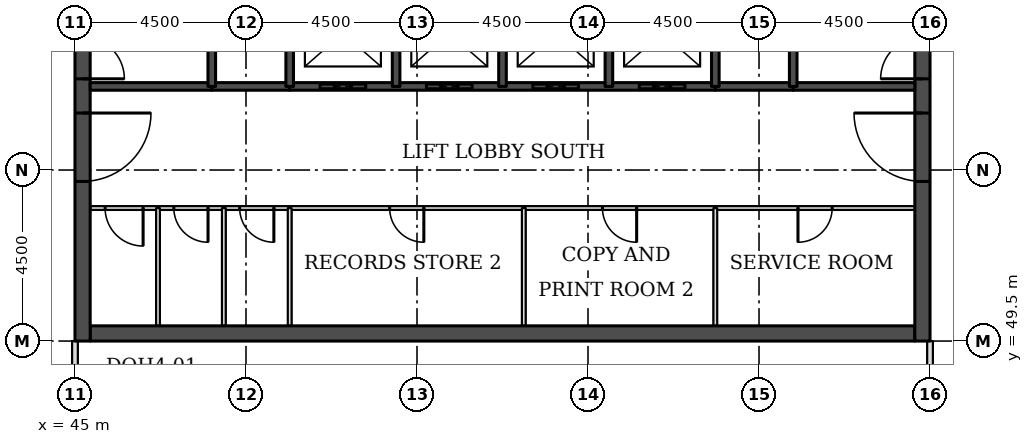
"""IFC4 building model, lengths in metres.
Left out: names, types, materials, properties, quantities, classifications, styles, units other than length and angle.
Written with IfcOpenShell. Run it as: python <this file> out.ifc"""

import sys

from ifc_helpers import new_model, si_unit, direction, frame, frame_2d, origin, place, context, subcontext, project, spatial, rectangle, extrude, element, fill, save


model = new_model("IFC4")
c1 = context("Model", 3, precision=1e-05, world=origin(), true_north=direction((0.0, 1.0)))
c2 = subcontext(c1, "Body", "Model", "MODEL_VIEW")
j1 = project(units=[si_unit("LENGTHUNIT", "METRE"), si_unit("PLANEANGLEUNIT", "RADIAN")], contexts=[c1])
p1 = place(None, origin())
s1 = spatial("IfcSite", under=j1, at=p1, CompositionType="ELEMENT")
p2 = place(p1, origin())
s2 = spatial("IfcBuilding", under=s1, at=p2, CompositionType="ELEMENT")
p3 = place(p2, frame((0.0, 0.0, 169.9)))
s3 = spatial("IfcBuildingStorey", under=s2, at=p3, CompositionType="ELEMENT", Elevation=169.9)
p4 = place(p3, frame((45.4, 49.7, 0.0), z_axis=(0.0, 0.0, 1.0), x_axis=(1.0, 0.0, 0.0)))
e1 = element("IfcWall", 1, at=p4, inside=s3, PredefinedType="SHEAR", context=c2, shape_type="SweptSolid", body=[
    extrude(rectangle(XDim=21.7, YDim=0.4, at=frame_2d((10.85, 0.0))), origin(), (0.0, 0.0, 1.0), 3.7),
])
p5 = place(p3, frame((45.2, 49.5, 0.0), z_axis=(0.0, 0.0, 1.0), x_axis=(0.0, 1.0, 0.0)))
e2 = element("IfcWall", 2, at=p5, inside=s3, PredefinedType="SHEAR", context=c2, shape_type="SweptSolid", body=[
    extrude(rectangle(XDim=22.5, YDim=0.4, at=frame_2d((11.25, 0.0))), origin(), (0.0, 0.0, 1.0), 3.7),
])
p6 = place(p5, frame((4.2, 0.0, 0.0)))
e3 = element("IfcOpeningElement", 3, at=p6, cuts=e2, PredefinedType="OPENING", context=c2, shape_type="SweptSolid", body=[
    extrude(rectangle(XDim=1.8, YDim=2.1, at=frame_2d((0.9, 1.05))), frame((0.0, 0.21, 0.0), z_axis=(0.0, -1.0, 0.0), x_axis=(1.0, 0.0, 0.0)), (0.0, 0.0, 1.0), 0.42),
])
p7 = place(p5, frame((6.9, 0.0, 0.0)))
e4 = element("IfcOpeningElement", 4, at=p7, cuts=e2, PredefinedType="OPENING", context=c2, shape_type="SweptSolid", body=[
    extrude(rectangle(XDim=1.1, YDim=2.1, at=frame_2d((0.55, 1.05))), frame((0.0, 0.21, 0.0), z_axis=(0.0, -1.0, 0.0), x_axis=(1.0, 0.0, 0.0)), (0.0, 0.0, 1.0), 0.42),
])
p8 = place(p5, frame((13.6, 0.0, 0.0)))
e5 = element("IfcOpeningElement", 5, at=p8, cuts=e2, PredefinedType="OPENING", context=c2, shape_type="SweptSolid", body=[
    extrude(rectangle(XDim=1.1, YDim=2.1, at=frame_2d((0.55, 1.05))), frame((0.0, 0.21, 0.0), z_axis=(0.0, -1.0, 0.0), x_axis=(1.0, 0.0, 0.0)), (0.0, 0.0, 1.0), 0.42),
])
p9 = place(p5, frame((16.5, 0.0, 0.0)))
e6 = element("IfcOpeningElement", 6, at=p9, cuts=e2, PredefinedType="OPENING", context=c2, shape_type="SweptSolid", body=[
    extrude(rectangle(XDim=1.8, YDim=2.1, at=frame_2d((0.9, 1.05))), frame((0.0, 0.21, 0.0), z_axis=(0.0, -1.0, 0.0), x_axis=(1.0, 0.0, 0.0)), (0.0, 0.0, 1.0), 0.42),
])
p10 = place(p3, frame((67.3, 49.5, 0.0), z_axis=(0.0, 0.0, 1.0), x_axis=(0.0, 1.0, 0.0)))
e7 = element("IfcWall", 7, at=p10, inside=s3, PredefinedType="SHEAR", context=c2, shape_type="SweptSolid", body=[
    extrude(rectangle(XDim=22.5, YDim=0.4, at=frame_2d((11.25, 0.0))), origin(), (0.0, 0.0, 1.0), 3.7),
])
p11 = place(p10, frame((4.2, 0.0, 0.0)))
e8 = element("IfcOpeningElement", 8, at=p11, cuts=e7, PredefinedType="OPENING", context=c2, shape_type="SweptSolid", body=[
    extrude(rectangle(XDim=1.8, YDim=2.1, at=frame_2d((0.9, 1.05))), frame((0.0, 0.21, 0.0), z_axis=(0.0, -1.0, 0.0), x_axis=(1.0, 0.0, 0.0)), (0.0, 0.0, 1.0), 0.42),
])
p12 = place(p10, frame((6.9, 0.0, 0.0)))
e9 = element("IfcOpeningElement", 9, at=p12, cuts=e7, PredefinedType="OPENING", context=c2, shape_type="SweptSolid", body=[
    extrude(rectangle(XDim=1.1, YDim=2.1, at=frame_2d((0.55, 1.05))), frame((0.0, 0.21, 0.0), z_axis=(0.0, -1.0, 0.0), x_axis=(1.0, 0.0, 0.0)), (0.0, 0.0, 1.0), 0.42),
])
p13 = place(p10, frame((13.6, 0.0, 0.0)))
e10 = element("IfcOpeningElement", 10, at=p13, cuts=e7, PredefinedType="OPENING", context=c2, shape_type="SweptSolid", body=[
    extrude(rectangle(XDim=1.1, YDim=2.1, at=frame_2d((0.55, 1.05))), frame((0.0, 0.21, 0.0), z_axis=(0.0, -1.0, 0.0), x_axis=(1.0, 0.0, 0.0)), (0.0, 0.0, 1.0), 0.42),
])
p14 = place(p10, frame((16.5, 0.0, 0.0)))
e11 = element("IfcOpeningElement", 11, at=p14, cuts=e7, PredefinedType="OPENING", context=c2, shape_type="SweptSolid", body=[
    extrude(rectangle(XDim=1.8, YDim=2.1, at=frame_2d((0.9, 1.05))), frame((0.0, 0.21, 0.0), z_axis=(0.0, -1.0, 0.0), x_axis=(1.0, 0.0, 0.0)), (0.0, 0.0, 1.0), 0.42),
])
p15 = place(p3, frame((67.5, 40.05, 0.0), z_axis=(0.0, 0.0, 1.0), x_axis=(0.0, 1.0, 0.0)))
e12 = element("IfcWall", 12, at=p15, inside=s3, PredefinedType="PARTITIONING", context=c2, shape_type="SweptSolid", body=[
    extrude(rectangle(XDim=9.45, YDim=0.15, at=frame_2d((4.725, 0.0))), origin(), (0.0, 0.0, 1.0), 3.022),
])
p16 = place(p3, frame((45.0, 48.0, 0.0), z_axis=(0.0, 0.0, 1.0), x_axis=(0.0, 1.0, 0.0)))
e13 = element("IfcWall", 13, at=p16, inside=s3, PredefinedType="PARTITIONING", context=c2, shape_type="SweptSolid", body=[
    extrude(rectangle(XDim=1.5, YDim=0.15, at=frame_2d((0.75, 0.0))), origin(), (0.0, 0.0, 1.0), 3.022),
])
p17 = place(p3, frame((45.4, 53.0, 0.0), z_axis=(0.0, 0.0, 1.0), x_axis=(1.0, 0.0, 0.0)))
e14 = element("IfcWall", 14, at=p17, inside=s3, PredefinedType="PARTITIONING", context=c2, shape_type="SweptSolid", body=[
    extrude(rectangle(XDim=21.7, YDim=0.1, at=frame_2d((10.85, 0.0))), origin(), (0.0, 0.0, 1.0), 3.55),
])
p18 = place(p17, frame((18.625, 0.0, 0.0)))
e15 = element("IfcOpeningElement", 15, at=p18, cuts=e14, PredefinedType="OPENING", context=c2, shape_type="SweptSolid", body=[
    extrude(rectangle(XDim=0.9, YDim=2.1, at=frame_2d((0.45, 1.05))), frame((0.0, 0.06, 0.0), z_axis=(0.0, -1.0, 0.0), x_axis=(1.0, 0.0, 0.0)), (0.0, 0.0, 1.0), 0.12),
])
p19 = place(p17, frame((0.393, 0.0, 0.0)))
e16 = element("IfcOpeningElement", 16, at=p19, cuts=e14, PredefinedType="OPENING", context=c2, shape_type="SweptSolid", body=[
    extrude(rectangle(XDim=1.0, YDim=2.1, at=frame_2d((0.5, 1.05))), frame((0.0, 0.06, 0.0), z_axis=(0.0, -1.0, 0.0), x_axis=(1.0, 0.0, 0.0)), (0.0, 0.0, 1.0), 0.12),
])
p20 = place(p17, frame((2.201, 0.0, 0.0)))
e17 = element("IfcOpeningElement", 17, at=p20, cuts=e14, PredefinedType="OPENING", context=c2, shape_type="SweptSolid", body=[
    extrude(rectangle(XDim=0.9, YDim=2.1, at=frame_2d((0.45, 1.05))), frame((0.0, 0.06, 0.0), z_axis=(0.0, -1.0, 0.0), x_axis=(1.0, 0.0, 0.0)), (0.0, 0.0, 1.0), 0.12),
])
p21 = place(p17, frame((3.934, 0.0, 0.0)))
e18 = element("IfcOpeningElement", 18, at=p21, cuts=e14, PredefinedType="OPENING", context=c2, shape_type="SweptSolid", body=[
    extrude(rectangle(XDim=0.9, YDim=2.1, at=frame_2d((0.45, 1.05))), frame((0.0, 0.06, 0.0), z_axis=(0.0, -1.0, 0.0), x_axis=(1.0, 0.0, 0.0)), (0.0, 0.0, 1.0), 0.12),
])
p22 = place(p17, frame((7.88, 0.0, 0.0)))
e19 = element("IfcOpeningElement", 19, at=p22, cuts=e14, PredefinedType="OPENING", context=c2, shape_type="SweptSolid", body=[
    extrude(rectangle(XDim=0.9, YDim=2.1, at=frame_2d((0.45, 1.05))), frame((0.0, 0.06, 0.0), z_axis=(0.0, -1.0, 0.0), x_axis=(1.0, 0.0, 0.0)), (0.0, 0.0, 1.0), 0.12),
])
p23 = place(p17, frame((13.48, 0.0, 0.0)))
e20 = element("IfcOpeningElement", 20, at=p23, cuts=e14, PredefinedType="OPENING", context=c2, shape_type="SweptSolid", body=[
    extrude(rectangle(XDim=0.9, YDim=2.1, at=frame_2d((0.45, 1.05))), frame((0.0, 0.06, 0.0), z_axis=(0.0, -1.0, 0.0), x_axis=(1.0, 0.0, 0.0)), (0.0, 0.0, 1.0), 0.12),
])
for number, where, z_axis, x_axis in (
    (21, (48.6, 56.2, 0.0), (0.0, 0.0, 1.0), (1.0, 0.0, 0.0)),
    (22, (61.85, 56.2, 0.0), (0.0, 0.0, 1.0), (1.0, 0.0, 0.0)),
):
    element("IfcWall", number, at=place(p3, frame(where, z_axis=z_axis, x_axis=x_axis)), inside=s3, PredefinedType="SOLIDWALL", context=c2, shape_type="SweptSolid", body=[
        extrude(rectangle(XDim=2.05, YDim=0.2, at=frame_2d((1.025, 0.0))), origin(), (0.0, 0.0, 1.0), 3.55),
    ])
p24 = place(p3, frame((45.4, 56.2, 0.0), z_axis=(0.0, 0.0, 1.0), x_axis=(1.0, 0.0, 0.0)))
e23 = element("IfcWall", 23, at=p24, inside=s3, PredefinedType="SOLIDWALL", context=c2, shape_type="SweptSolid", body=[
    extrude(rectangle(XDim=3.2, YDim=0.2, at=frame_2d((1.6, 0.0))), origin(), (0.0, 0.0, 1.0), 3.55),
])
p25 = place(p3, frame((50.65, 56.2, 0.0), z_axis=(0.0, 0.0, 1.0), x_axis=(1.0, 0.0, 0.0)))
e24 = element("IfcWall", 24, at=p25, inside=s3, PredefinedType="SOLIDWALL", context=c2, shape_type="SweptSolid", body=[
    extrude(rectangle(XDim=11.2, YDim=0.2, at=frame_2d((5.6, 0.0))), origin(), (0.0, 0.0, 1.0), 3.55),
])
p26 = place(p25, frame((0.8, 0.0, 0.0)))
e25 = element("IfcOpeningElement", 25, at=p26, cuts=e24, PredefinedType="OPENING", context=c2, shape_type="SweptSolid", body=[
    extrude(rectangle(XDim=1.2, YDim=2.1, at=frame_2d((0.6, 1.05))), frame((0.0, 0.11, 0.0), z_axis=(0.0, -1.0, 0.0), x_axis=(1.0, 0.0, 0.0)), (0.0, 0.0, 1.0), 0.22),
])
p27 = place(p25, frame((3.6, 0.0, 0.0)))
e26 = element("IfcOpeningElement", 26, at=p27, cuts=e24, PredefinedType="OPENING", context=c2, shape_type="SweptSolid", body=[
    extrude(rectangle(XDim=1.2, YDim=2.1, at=frame_2d((0.6, 1.05))), frame((0.0, 0.11, 0.0), z_axis=(0.0, -1.0, 0.0), x_axis=(1.0, 0.0, 0.0)), (0.0, 0.0, 1.0), 0.22),
])
p28 = place(p25, frame((6.4, 0.0, 0.0)))
e27 = element("IfcOpeningElement", 27, at=p28, cuts=e24, PredefinedType="OPENING", context=c2, shape_type="SweptSolid", body=[
    extrude(rectangle(XDim=1.2, YDim=2.1, at=frame_2d((0.6, 1.05))), frame((0.0, 0.11, 0.0), z_axis=(0.0, -1.0, 0.0), x_axis=(1.0, 0.0, 0.0)), (0.0, 0.0, 1.0), 0.22),
])
p29 = place(p25, frame((9.2, 0.0, 0.0)))
e28 = element("IfcOpeningElement", 28, at=p29, cuts=e24, PredefinedType="OPENING", context=c2, shape_type="SweptSolid", body=[
    extrude(rectangle(XDim=1.2, YDim=2.1, at=frame_2d((0.6, 1.05))), frame((0.0, 0.11, 0.0), z_axis=(0.0, -1.0, 0.0), x_axis=(1.0, 0.0, 0.0)), (0.0, 0.0, 1.0), 0.22),
])
p30 = place(p3, frame((63.9, 56.2, 0.0), z_axis=(0.0, 0.0, 1.0), x_axis=(1.0, 0.0, 0.0)))
e29 = element("IfcWall", 29, at=p30, inside=s3, PredefinedType="SOLIDWALL", context=c2, shape_type="SweptSolid", body=[
    extrude(rectangle(XDim=3.2, YDim=0.2, at=frame_2d((1.6, 0.0))), origin(), (0.0, 0.0, 1.0), 3.55),
])
p31 = place(p3, frame((47.185, 49.9, 0.0), z_axis=(0.0, 0.0, 1.0), x_axis=(0.0, 1.0, 0.0)))
e30 = element("IfcWall", 30, at=p31, inside=s3, PredefinedType="PARTITIONING", context=c2, shape_type="SweptSolid", body=[
    extrude(rectangle(XDim=3.1, YDim=0.1, at=frame_2d((1.55, 0.0))), origin(), (0.0, 0.0, 1.0), 3.55),
])
p32 = place(p3, frame((48.6, 56.2, 0.0), z_axis=(0.0, 0.0, 1.0), x_axis=(0.0, 1.0, 0.0)))
e31 = element("IfcWall", 31, at=p32, inside=s3, PredefinedType="SOLIDWALL", context=c2, shape_type="SweptSolid", body=[
    extrude(rectangle(XDim=5.8, YDim=0.2, at=frame_2d((2.9, 0.0))), origin(), (0.0, 0.0, 1.0), 3.55),
])
for number, where, z_axis, x_axis in (
    (32, (48.917, 49.9, 0.0), (0.0, 0.0, 1.0), (0.0, 1.0, 0.0)),
    (33, (50.65, 49.9, 0.0), (0.0, 0.0, 1.0), (0.0, 1.0, 0.0)),
):
    element("IfcWall", number, at=place(p3, frame(where, z_axis=z_axis, x_axis=x_axis)), inside=s3, PredefinedType="PARTITIONING", context=c2, shape_type="SweptSolid", body=[
        extrude(rectangle(XDim=3.1, YDim=0.1, at=frame_2d((1.55, 0.0))), origin(), (0.0, 0.0, 1.0), 3.55),
    ])
for number, where, z_axis, x_axis in (
    (34, (50.65, 56.2, 0.0), (0.0, 0.0, 1.0), (0.0, 1.0, 0.0)),
    (35, (53.45, 56.2, 0.0), (0.0, 0.0, 1.0), (0.0, 1.0, 0.0)),
    (36, (56.25, 56.2, 0.0), (0.0, 0.0, 1.0), (0.0, 1.0, 0.0)),
):
    element("IfcWall", number, at=place(p3, frame(where, z_axis=z_axis, x_axis=x_axis)), inside=s3, PredefinedType="SOLIDWALL", context=c2, shape_type="SweptSolid", body=[
        extrude(rectangle(XDim=2.8, YDim=0.2, at=frame_2d((1.4, 0.0))), origin(), (0.0, 0.0, 1.0), 3.55),
    ])
p33 = place(p3, frame((56.81, 49.9, 0.0), z_axis=(0.0, 0.0, 1.0), x_axis=(0.0, 1.0, 0.0)))
e37 = element("IfcWall", 37, at=p33, inside=s3, PredefinedType="PARTITIONING", context=c2, shape_type="SweptSolid", body=[
    extrude(rectangle(XDim=3.1, YDim=0.1, at=frame_2d((1.55, 0.0))), origin(), (0.0, 0.0, 1.0), 3.55),
])
p34 = place(p3, frame((59.05, 56.2, 0.0), z_axis=(0.0, 0.0, 1.0), x_axis=(0.0, 1.0, 0.0)))
e38 = element("IfcWall", 38, at=p34, inside=s3, PredefinedType="SOLIDWALL", context=c2, shape_type="SweptSolid", body=[
    extrude(rectangle(XDim=2.8, YDim=0.2, at=frame_2d((1.4, 0.0))), origin(), (0.0, 0.0, 1.0), 3.55),
])
p35 = place(p3, frame((61.85, 49.9, 0.0), z_axis=(0.0, 0.0, 1.0), x_axis=(0.0, 1.0, 0.0)))
e39 = element("IfcWall", 39, at=p35, inside=s3, PredefinedType="PARTITIONING", context=c2, shape_type="SweptSolid", body=[
    extrude(rectangle(XDim=3.1, YDim=0.1, at=frame_2d((1.55, 0.0))), origin(), (0.0, 0.0, 1.0), 3.55),
])
p36 = place(p3, frame((61.85, 56.2, 0.0), z_axis=(0.0, 0.0, 1.0), x_axis=(0.0, 1.0, 0.0)))
e40 = element("IfcWall", 40, at=p36, inside=s3, PredefinedType="SOLIDWALL", context=c2, shape_type="SweptSolid", body=[
    extrude(rectangle(XDim=2.8, YDim=0.2, at=frame_2d((1.4, 0.0))), origin(), (0.0, 0.0, 1.0), 3.55),
])
p37 = place(p3, frame((63.9, 56.2, 0.0), z_axis=(0.0, 0.0, 1.0), x_axis=(0.0, 1.0, 0.0)))
e41 = element("IfcWall", 41, at=p37, inside=s3, PredefinedType="SOLIDWALL", context=c2, shape_type="SweptSolid", body=[
    extrude(rectangle(XDim=5.8, YDim=0.2, at=frame_2d((2.9, 0.0))), origin(), (0.0, 0.0, 1.0), 3.55),
])
p38 = place(p26, origin())
e42 = element("IfcDoor", 42, at=p38, inside=s3, OperationType="DOUBLE_DOOR_SLIDING", PredefinedType="DOOR", context=c2, shape_type="SweptSolid", body=[
    extrude(rectangle(XDim=1.2, YDim=2.1, at=frame_2d((0.6, 1.05))), frame((0.0, 0.025, 0.0), z_axis=(0.0, -1.0, 0.0), x_axis=(1.0, 0.0, 0.0)), (0.0, 0.0, 1.0), 0.05),
])
fill(e25, e42)
p39 = place(p27, origin())
e43 = element("IfcDoor", 43, at=p39, inside=s3, OperationType="DOUBLE_DOOR_SLIDING", PredefinedType="DOOR", context=c2, shape_type="SweptSolid", body=[
    extrude(rectangle(XDim=1.2, YDim=2.1, at=frame_2d((0.6, 1.05))), frame((0.0, 0.025, 0.0), z_axis=(0.0, -1.0, 0.0), x_axis=(1.0, 0.0, 0.0)), (0.0, 0.0, 1.0), 0.05),
])
fill(e26, e43)
p40 = place(p28, origin())
e44 = element("IfcDoor", 44, at=p40, inside=s3, OperationType="DOUBLE_DOOR_SLIDING", PredefinedType="DOOR", context=c2, shape_type="SweptSolid", body=[
    extrude(rectangle(XDim=1.2, YDim=2.1, at=frame_2d((0.6, 1.05))), frame((0.0, 0.025, 0.0), z_axis=(0.0, -1.0, 0.0), x_axis=(1.0, 0.0, 0.0)), (0.0, 0.0, 1.0), 0.05),
])
fill(e27, e44)
p41 = place(p29, origin())
e45 = element("IfcDoor", 45, at=p41, inside=s3, OperationType="DOUBLE_DOOR_SLIDING", PredefinedType="DOOR", context=c2, shape_type="SweptSolid", body=[
    extrude(rectangle(XDim=1.2, YDim=2.1, at=frame_2d((0.6, 1.05))), frame((0.0, 0.025, 0.0), z_axis=(0.0, -1.0, 0.0), x_axis=(1.0, 0.0, 0.0)), (0.0, 0.0, 1.0), 0.05),
])
fill(e28, e45)
p42 = place(p6, frame((1.8, 0.0, 0.0), z_axis=(0.0, 0.0, 1.0), x_axis=(-1.0, 0.0, 0.0)))
e46 = element("IfcDoor", 46, at=p42, inside=s3, OperationType="SINGLE_SWING_LEFT", PredefinedType="DOOR", context=c2, shape_type="SweptSolid", body=[
    extrude(rectangle(XDim=1.8, YDim=2.1, at=frame_2d((0.9, 1.05))), frame((0.0, 0.025, 0.0), z_axis=(0.0, -1.0, 0.0), x_axis=(1.0, 0.0, 0.0)), (0.0, 0.0, 1.0), 0.05),
])
fill(e3, e46)
p43 = place(p7, frame((1.1, 0.0, 0.0), z_axis=(0.0, 0.0, 1.0), x_axis=(-1.0, 0.0, 0.0)))
e47 = element("IfcDoor", 47, at=p43, inside=s3, OperationType="SINGLE_SWING_RIGHT", PredefinedType="DOOR", context=c2, shape_type="SweptSolid", body=[
    extrude(rectangle(XDim=1.1, YDim=2.1, at=frame_2d((0.55, 1.05))), frame((0.0, 0.025, 0.0), z_axis=(0.0, -1.0, 0.0), x_axis=(1.0, 0.0, 0.0)), (0.0, 0.0, 1.0), 0.05),
])
fill(e4, e47)
p44 = place(p11, origin())
e48 = element("IfcDoor", 48, at=p44, inside=s3, OperationType="SINGLE_SWING_RIGHT", PredefinedType="DOOR", context=c2, shape_type="SweptSolid", body=[
    extrude(rectangle(XDim=1.8, YDim=2.1, at=frame_2d((0.9, 1.05))), frame((0.0, 0.025, 0.0), z_axis=(0.0, -1.0, 0.0), x_axis=(1.0, 0.0, 0.0)), (0.0, 0.0, 1.0), 0.05),
])
fill(e8, e48)
p45 = place(p12, origin())
e49 = element("IfcDoor", 49, at=p45, inside=s3, OperationType="SINGLE_SWING_LEFT", PredefinedType="DOOR", context=c2, shape_type="SweptSolid", body=[
    extrude(rectangle(XDim=1.1, YDim=2.1, at=frame_2d((0.55, 1.05))), frame((0.0, 0.025, 0.0), z_axis=(0.0, -1.0, 0.0), x_axis=(1.0, 0.0, 0.0)), (0.0, 0.0, 1.0), 0.05),
])
fill(e9, e49)
p46 = place(p18, frame((0.9, 0.0, 0.0), z_axis=(0.0, 0.0, 1.0), x_axis=(-1.0, 0.0, 0.0)))
e50 = element("IfcDoor", 50, at=p46, inside=s3, OperationType="SINGLE_SWING_RIGHT", PredefinedType="DOOR", context=c2, shape_type="SweptSolid", body=[
    extrude(rectangle(XDim=0.9, YDim=2.1, at=frame_2d((0.45, 1.05))), frame((0.0, 0.025, 0.0), z_axis=(0.0, -1.0, 0.0), x_axis=(1.0, 0.0, 0.0)), (0.0, 0.0, 1.0), 0.05),
])
fill(e15, e50)
p47 = place(p19, frame((1.0, 0.0, 0.0), z_axis=(0.0, 0.0, 1.0), x_axis=(-1.0, 0.0, 0.0)))
e51 = element("IfcDoor", 51, at=p47, inside=s3, OperationType="SINGLE_SWING_LEFT", PredefinedType="DOOR", context=c2, shape_type="SweptSolid", body=[
    extrude(rectangle(XDim=1.0, YDim=2.1, at=frame_2d((0.5, 1.05))), frame((0.0, 0.025, 0.0), z_axis=(0.0, -1.0, 0.0), x_axis=(1.0, 0.0, 0.0)), (0.0, 0.0, 1.0), 0.05),
])
fill(e16, e51)
p48 = place(p20, frame((0.9, 0.0, 0.0), z_axis=(0.0, 0.0, 1.0), x_axis=(-1.0, 0.0, 0.0)))
e52 = element("IfcDoor", 52, at=p48, inside=s3, OperationType="SINGLE_SWING_LEFT", PredefinedType="DOOR", context=c2, shape_type="SweptSolid", body=[
    extrude(rectangle(XDim=0.9, YDim=2.1, at=frame_2d((0.45, 1.05))), frame((0.0, 0.025, 0.0), z_axis=(0.0, -1.0, 0.0), x_axis=(1.0, 0.0, 0.0)), (0.0, 0.0, 1.0), 0.05),
])
fill(e17, e52)
p49 = place(p21, frame((0.9, 0.0, 0.0), z_axis=(0.0, 0.0, 1.0), x_axis=(-1.0, 0.0, 0.0)))
e53 = element("IfcDoor", 53, at=p49, inside=s3, OperationType="SINGLE_SWING_LEFT", PredefinedType="DOOR", context=c2, shape_type="SweptSolid", body=[
    extrude(rectangle(XDim=0.9, YDim=2.1, at=frame_2d((0.45, 1.05))), frame((0.0, 0.025, 0.0), z_axis=(0.0, -1.0, 0.0), x_axis=(1.0, 0.0, 0.0)), (0.0, 0.0, 1.0), 0.05),
])
fill(e18, e53)
p50 = place(p22, frame((0.9, 0.0, 0.0), z_axis=(0.0, 0.0, 1.0), x_axis=(-1.0, 0.0, 0.0)))
e54 = element("IfcDoor", 54, at=p50, inside=s3, OperationType="SINGLE_SWING_LEFT", PredefinedType="DOOR", context=c2, shape_type="SweptSolid", body=[
    extrude(rectangle(XDim=0.9, YDim=2.1, at=frame_2d((0.45, 1.05))), frame((0.0, 0.025, 0.0), z_axis=(0.0, -1.0, 0.0), x_axis=(1.0, 0.0, 0.0)), (0.0, 0.0, 1.0), 0.05),
])
fill(e19, e54)
p51 = place(p23, frame((0.9, 0.0, 0.0), z_axis=(0.0, 0.0, 1.0), x_axis=(-1.0, 0.0, 0.0)))
e55 = element("IfcDoor", 55, at=p51, inside=s3, OperationType="SINGLE_SWING_LEFT", PredefinedType="DOOR", context=c2, shape_type="SweptSolid", body=[
    extrude(rectangle(XDim=0.9, YDim=2.1, at=frame_2d((0.45, 1.05))), frame((0.0, 0.025, 0.0), z_axis=(0.0, -1.0, 0.0), x_axis=(1.0, 0.0, 0.0)), (0.0, 0.0, 1.0), 0.05),
])
fill(e20, e55)
save(model, sys.argv[1])
